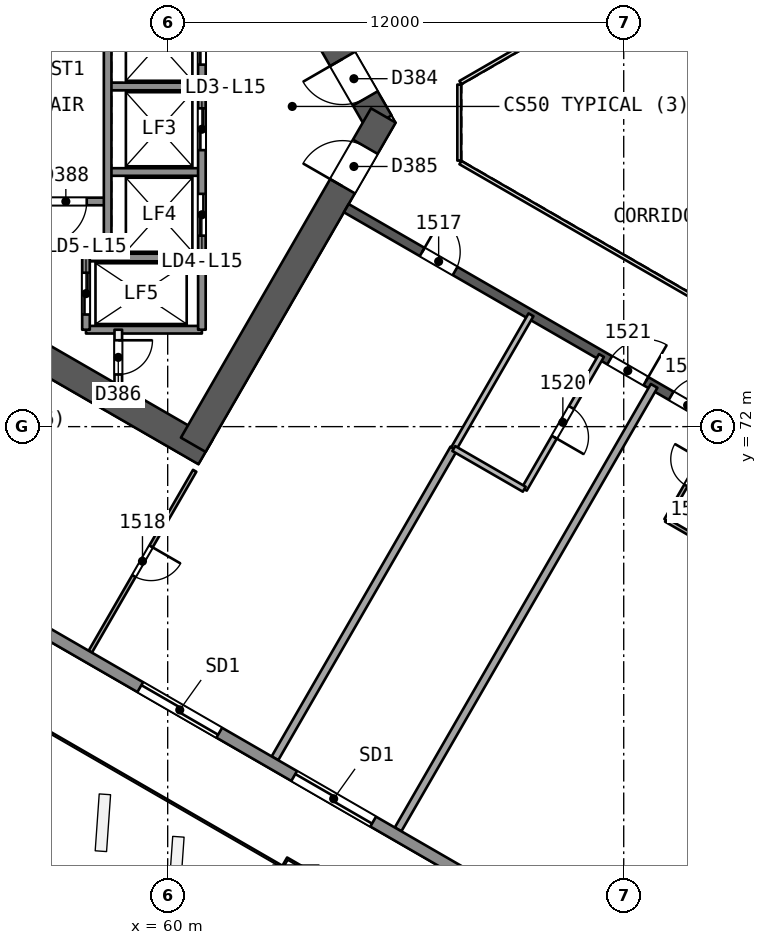
"""IFC4 building model, lengths in metres.
Left out: names, types, materials, properties, quantities, classifications, styles, units other than length and angle.
Written with IfcOpenShell. Run it as: python <this file> out.ifc"""

import sys

from ifc_helpers import new_model, si_unit, direction, frame, frame_2d, origin, origin_2d, place, context, subcontext, project, spatial, rectangle, extrude, element, fill, save


model = new_model("IFC4")
c1 = context("Model", 3, precision=1e-05, world=origin(), true_north=direction((0.0, 1.0)))
c2 = subcontext(c1, "Body", "Model", "MODEL_VIEW")
j1 = project(units=[si_unit("LENGTHUNIT", "METRE"), si_unit("PLANEANGLEUNIT", "RADIAN")], contexts=[c1])
p1 = place(None, origin())
s1 = spatial("IfcSite", under=j1, at=p1, CompositionType="ELEMENT")
p2 = place(p1, origin())
s2 = spatial("IfcBuilding", under=s1, at=p2, CompositionType="ELEMENT")
p3 = place(p2, frame((0.0, 0.0, 68.4)))
s3 = spatial("IfcBuildingStorey", under=s2, at=p3, CompositionType="ELEMENT", Elevation=68.4)
p4 = place(p3, frame((65.567, 80.0, 0.0), z_axis=(0.0, 0.0, 1.0), x_axis=(-0.499988615364, 0.866031976607, 0.0)))
e1 = element("IfcWall", 1, at=p4, inside=s3, PredefinedType="SHEAR", context=c2, shape_type="SweptSolid", body=[
    extrude(rectangle(XDim=10.163, YDim=0.75, at=frame_2d((5.082, 0.0))), origin(), (0.0, 0.0, 1.0), 3.7),
])
p5 = place(p4, frame((0.733, 0.0, 0.0)))
e2 = element("IfcOpeningElement", 2, at=p5, cuts=e1, PredefinedType="OPENING", context=c2, shape_type="SweptSolid", body=[
    extrude(rectangle(XDim=1.2, YDim=2.1, at=frame_2d((0.6, 1.05))), frame((0.0, 0.385, 0.0), z_axis=(0.0, -1.0, 0.0), x_axis=(1.0, 0.0, 0.0)), (0.0, 0.0, 1.0), 0.771),
])
p6 = place(p3, frame((60.673, 88.477, 0.0), z_axis=(0.0, 0.0, 1.0), x_axis=(-0.8660248072, -0.500001033313, 0.0)))
e3 = element("IfcWall", 3, at=p6, inside=s3, PredefinedType="SHEAR", context=c2, shape_type="SweptSolid", body=[
    extrude(rectangle(XDim=13.958, YDim=0.75, at=frame_2d((6.979, 0.0))), origin(), (0.0, 0.0, 1.0), 3.7),
])
p7 = place(p3, frame((48.772, 78.394, 0.0), z_axis=(0.0, 0.0, 1.0), x_axis=(0.866028339916, -0.499994914436, 0.0)))
e4 = element("IfcWall", 4, at=p7, inside=s3, PredefinedType="SHEAR", context=c2, shape_type="SweptSolid", body=[
    extrude(rectangle(XDim=14.117, YDim=0.75, at=frame_2d((7.059, 0.0))), origin(), (0.0, 0.0, 1.0), 3.7),
])
p8 = place(p3, frame((60.673, 71.523, 0.0), z_axis=(0.0, 0.0, 1.0), x_axis=(0.499997052475, 0.866027105532, 0.0)))
e5 = element("IfcWall", 5, at=p8, inside=s3, PredefinedType="SHEAR", context=c2, shape_type="SweptSolid", body=[
    extrude(rectangle(XDim=10.005, YDim=0.75, at=frame_2d((5.002, 0.0))), origin(), (0.0, 0.0, 1.0), 3.7),
])
p9 = place(p8, frame((7.855, 0.0, 0.0)))
e6 = element("IfcOpeningElement", 6, at=p9, cuts=e5, PredefinedType="OPENING", context=c2, shape_type="SweptSolid", body=[
    extrude(rectangle(XDim=1.2, YDim=2.1, at=frame_2d((0.6, 1.05))), frame((0.0, 0.385, 0.0), z_axis=(0.0, -1.0, 0.0), x_axis=(1.0, 0.0, 0.0)), (0.0, 0.0, 1.0), 0.771),
])
p10 = place(p3, frame((64.7, 77.748, 0.0), z_axis=(0.0, 0.0, 1.0), x_axis=(0.866026492143, -0.499998114903, 0.0)))
e7 = element("IfcWall", 7, at=p10, inside=s3, PredefinedType="SHEAR", context=c2, shape_type="SweptSolid", body=[
    extrude(rectangle(XDim=15.588, YDim=0.25, at=frame_2d((7.794, 0.0))), origin(), (0.0, 0.0, 1.0), 3.2),
])
p11 = place(p10, frame((2.306, 0.0, 0.0)))
e8 = element("IfcOpeningElement", 8, at=p11, cuts=e7, PredefinedType="OPENING", context=c2, shape_type="SweptSolid", body=[
    extrude(rectangle(XDim=1.0, YDim=2.1, at=frame_2d((0.5, 1.05))), frame((0.0, 0.135, 0.0), z_axis=(0.0, -1.0, 0.0), x_axis=(1.0, 0.0, 0.0)), (0.0, 0.0, 1.0), 0.271),
])
p12 = place(p10, frame((8.003, 0.0, 0.0)))
e9 = element("IfcOpeningElement", 9, at=p12, cuts=e7, PredefinedType="OPENING", context=c2, shape_type="SweptSolid", body=[
    extrude(rectangle(XDim=1.1, YDim=2.1, at=frame_2d((0.55, 1.05))), frame((0.0, 0.135, 0.0), z_axis=(0.0, -1.0, 0.0), x_axis=(1.0, 0.0, 0.0)), (0.0, 0.0, 1.0), 0.271),
])
p13 = place(p10, frame((9.871, 0.0, 0.0)))
e10 = element("IfcOpeningElement", 10, at=p13, cuts=e7, PredefinedType="OPENING", context=c2, shape_type="SweptSolid", body=[
    extrude(rectangle(XDim=1.0, YDim=2.1, at=frame_2d((0.5, 1.05))), frame((0.0, 0.135, 0.0), z_axis=(0.0, -1.0, 0.0), x_axis=(1.0, 0.0, 0.0)), (0.0, 0.0, 1.0), 0.271),
])
p14 = place(p3, frame((63.363, 59.844, 0.0), z_axis=(0.010092954999, 0.017481261926, 0.999796248113), x_axis=(-0.499907135807, -0.865843746475, 0.020185694418)))
e11 = element("IfcColumn", 11, at=p14, inside=s3, PredefinedType="COLUMN", context=c2, shape_type="SweptSolid", body=[
    extrude(rectangle(XDim=1.1, YDim=1.1, at=origin_2d()), origin(), (0.0, 0.0, 1.0), 3.701),
])
p15 = place(p3, frame((60.71, 70.838, 0.0), z_axis=(0.0, 0.0, 1.0), x_axis=(-0.499974920023, -0.866039883231, 0.0)))
e12 = element("IfcWall", 12, at=p15, inside=s3, PredefinedType="PARTITIONING", context=c2, shape_type="SweptSolid", body=[
    extrude(rectangle(XDim=5.497, YDim=0.1, at=frame_2d((2.749, 0.0))), origin(), (0.0, 0.0, 1.0), 3.2),
])
p16 = place(p15, frame((2.298, 0.0, 0.0)))
e13 = element("IfcOpeningElement", 13, at=p16, cuts=e12, PredefinedType="OPENING", context=c2, shape_type="SweptSolid", body=[
    extrude(rectangle(XDim=0.9, YDim=2.1, at=frame_2d((0.45, 1.05))), frame((0.0, 0.061, 0.0), z_axis=(0.0, -1.0, 0.0), x_axis=(1.0, 0.0, 0.0)), (0.0, 0.0, 1.0), 0.121),
])
p17 = place(p3, frame((62.822, 63.272, 0.0), z_axis=(0.0, 0.0, 1.0), x_axis=(0.50001657107, 0.866015836261, 0.0)))
e14 = element("IfcWall", 14, at=p17, inside=s3, PredefinedType="PARTITIONING", context=c2, shape_type="SweptSolid", body=[
    extrude(rectangle(XDim=9.413, YDim=0.2, at=frame_2d((4.707, 0.0))), origin(), (0.0, 0.0, 1.0), 3.2),
])
p18 = place(p3, frame((67.529, 71.424, 0.0), z_axis=(0.0, 0.0, 1.0), x_axis=(0.499984252764, 0.866034495264, 0.0)))
e15 = element("IfcWall", 15, at=p18, inside=s3, PredefinedType="PARTITIONING", context=c2, shape_type="SweptSolid", body=[
    extrude(rectangle(XDim=4.063, YDim=0.15, at=frame_2d((2.032, 0.0))), origin(), (0.0, 0.0, 1.0), 3.2),
])
p19 = place(p3, frame((71.414, 73.872, 0.0), z_axis=(0.0, 0.0, 1.0), x_axis=(-0.499984252764, -0.866034495264, 0.0)))
e16 = element("IfcWall", 16, at=p19, inside=s3, PredefinedType="PARTITIONING", context=c2, shape_type="SweptSolid", body=[
    extrude(rectangle(XDim=4.063, YDim=0.15, at=frame_2d((2.032, 0.0))), origin(), (0.0, 0.0, 1.0), 3.2),
])
p20 = place(p19, frame((1.582, 0.0, 0.0)))
e17 = element("IfcOpeningElement", 17, at=p20, cuts=e16, PredefinedType="OPENING", context=c2, shape_type="SweptSolid", body=[
    extrude(rectangle(XDim=0.9, YDim=2.1, at=frame_2d((0.45, 1.05))), frame((0.0, 0.085, 0.0), z_axis=(0.0, -1.0, 0.0), x_axis=(1.0, 0.0, 0.0)), (0.0, 0.0, 1.0), 0.171),
])
p21 = place(p3, frame((69.383, 70.353, 0.0), z_axis=(0.0, 0.0, 1.0), x_axis=(-0.866024183959, 0.500002112793, 0.0)))
e18 = element("IfcWall", 18, at=p21, inside=s3, PredefinedType="PARTITIONING", context=c2, shape_type="SweptSolid", body=[
    extrude(rectangle(XDim=2.141, YDim=0.15, at=frame_2d((1.071, 0.0))), origin(), (0.0, 0.0, 1.0), 3.2),
])
p22 = place(p3, frame((66.062, 61.401, 0.0), z_axis=(0.0, 0.0, 1.0), x_axis=(0.500006826849, 0.866021462265, 0.0)))
e19 = element("IfcWall", 19, at=p22, inside=s3, PredefinedType="PARTITIONING", context=c2, shape_type="SweptSolid", body=[
    extrude(rectangle(XDim=13.476, YDim=0.2, at=frame_2d((6.738, 0.0))), origin(), (0.0, 0.0, 1.0), 3.2),
])
p23 = place(p3, frame((74.498, 68.743, 0.0), z_axis=(0.0, 0.0, 1.0), x_axis=(-0.865989903783, 0.500061482766, 0.0)))
e20 = element("IfcWall", 20, at=p23, inside=s3, PredefinedType="PARTITIONING", context=c2, shape_type="SweptSolid", body=[
    extrude(rectangle(XDim=1.6, YDim=0.1, at=frame_2d((0.8, 0.0))), origin(), (0.0, 0.0, 1.0), 3.2),
])
p24 = place(p3, frame((73.113, 69.543, 0.0), z_axis=(0.0, 0.0, 1.0), x_axis=(0.499987231761, 0.866032775405, 0.0)))
e21 = element("IfcWall", 21, at=p24, inside=s3, PredefinedType="PARTITIONING", context=c2, shape_type="SweptSolid", body=[
    extrude(rectangle(XDim=2.9, YDim=0.1, at=frame_2d((1.45, 0.0))), origin(), (0.0, 0.0, 1.0), 3.2),
])
p25 = place(p24, frame((1.05, 0.0, 0.0)))
e22 = element("IfcOpeningElement", 22, at=p25, cuts=e21, PredefinedType="OPENING", context=c2, shape_type="SweptSolid", body=[
    extrude(rectangle(XDim=0.8, YDim=2.1, at=frame_2d((0.4, 1.05))), frame((0.0, 0.061, 0.0), z_axis=(0.0, -1.0, 0.0), x_axis=(1.0, 0.0, 0.0)), (0.0, 0.0, 1.0), 0.121),
])
p26 = place(p3, frame((90.443, 47.153, 0.0), z_axis=(0.0, 0.0, 1.0), x_axis=(-0.866024382485, 0.500001768939, 0.0)))
e23 = element("IfcWall", 23, at=p26, inside=s3, PredefinedType="SOLIDWALL", context=c2, shape_type="SweptSolid", body=[
    extrude(rectangle(XDim=59.596, YDim=0.3, at=frame_2d((29.798, 0.0))), origin(), (0.0, 0.0, 1.0), 3.2),
])
p27 = place(p26, frame((28.91, 0.0, 0.0)))
e24 = element("IfcOpeningElement", 24, at=p27, cuts=e23, PredefinedType="OPENING", context=c2, shape_type="SweptSolid", body=[
    extrude(rectangle(XDim=2.4, YDim=2.4, at=frame_2d((1.2, 1.2))), frame((0.0, 0.161, 0.0), z_axis=(0.0, -1.0, 0.0), x_axis=(1.0, 0.0, 0.0)), (0.0, 0.0, 1.0), 0.321),
])
p28 = place(p26, frame((33.586, 0.0, 0.0)))
e25 = element("IfcOpeningElement", 25, at=p28, cuts=e23, PredefinedType="OPENING", context=c2, shape_type="SweptSolid", body=[
    extrude(rectangle(XDim=2.4, YDim=2.4, at=frame_2d((1.2, 1.2))), frame((0.0, 0.161, 0.0), z_axis=(0.0, -1.0, 0.0), x_axis=(1.0, 0.0, 0.0)), (0.0, 0.0, 1.0), 0.321),
])
p29 = place(p26, frame((46.23, 0.0, 0.0)))
e26 = element("IfcOpeningElement", 26, at=p29, cuts=e23, PredefinedType="OPENING", context=c2, shape_type="SweptSolid", body=[
    extrude(rectangle(XDim=2.4, YDim=2.4, at=frame_2d((1.2, 1.2))), frame((0.0, 0.161, 0.0), z_axis=(0.0, -1.0, 0.0), x_axis=(1.0, 0.0, 0.0)), (0.0, 0.0, 1.0), 0.321),
])
p30 = place(p26, frame((12.876, 0.0, 0.0)))
e27 = element("IfcOpeningElement", 27, at=p30, cuts=e23, PredefinedType="OPENING", context=c2, shape_type="SweptSolid", body=[
    extrude(rectangle(XDim=2.4, YDim=2.4, at=frame_2d((1.2, 1.2))), frame((0.0, 0.161, 0.0), z_axis=(0.0, -1.0, 0.0), x_axis=(1.0, 0.0, 0.0)), (0.0, 0.0, 1.0), 0.321),
])
for number, where, z_axis, x_axis in (
    (28, (60.9, 80.95, 0.0), (0.0, 0.0, 1.0), (-1.0, 0.0, 0.0)),
    (29, (60.9, 78.7, 0.0), (0.0, 0.0, 1.0), (-1.0, 0.0, 0.0)),
):
    element("IfcWall", number, at=place(p3, frame(where, z_axis=z_axis, x_axis=x_axis)), inside=s3, PredefinedType="SOLIDWALL", context=c2, shape_type="SweptSolid", body=[
        extrude(rectangle(XDim=2.48, YDim=0.2, at=frame_2d((1.24, 0.0))), origin(), (0.0, 0.0, 1.0), 3.2),
    ])
p31 = place(p3, frame((58.42, 77.925, 0.0), z_axis=(0.0, 0.0, 1.0), x_axis=(-1.0, 0.0, 0.0)))
e30 = element("IfcWall", 30, at=p31, inside=s3, PredefinedType="SOLIDWALL", context=c2, shape_type="SweptSolid", body=[
    extrude(rectangle(XDim=7.7, YDim=0.2, at=frame_2d((3.85, 0.0))), origin(), (0.0, 0.0, 1.0), 3.2),
])
p32 = place(p31, frame((0.55, 0.0, 0.0)))
e31 = element("IfcOpeningElement", 31, at=p32, cuts=e30, PredefinedType="OPENING", context=c2, shape_type="SweptSolid", body=[
    extrude(rectangle(XDim=1.1, YDim=2.1, at=frame_2d((0.55, 1.05))), frame((0.0, 0.11, 0.0), z_axis=(0.0, -1.0, 0.0), x_axis=(1.0, 0.0, 0.0)), (0.0, 0.0, 1.0), 0.221),
])
for number, where, z_axis, x_axis in (
    (32, (60.9, 76.45, 0.0), (0.0, 0.0, 1.0), (-1.0, 0.0, 0.0)),
    (33, (60.9, 74.55, 0.0), (0.0, 0.0, 1.0), (-1.0, 0.0, 0.0)),
):
    element("IfcWall", number, at=place(p3, frame(where, z_axis=z_axis, x_axis=x_axis)), inside=s3, PredefinedType="SOLIDWALL", context=c2, shape_type="SweptSolid", body=[
        extrude(rectangle(XDim=3.05, YDim=0.2, at=frame_2d((1.525, 0.0))), origin(), (0.0, 0.0, 1.0), 3.2),
    ])
p33 = place(p3, frame((60.9, 85.45, 0.0), z_axis=(0.0, 0.0, 1.0), x_axis=(0.0, -1.0, 0.0)))
e34 = element("IfcWall", 34, at=p33, inside=s3, PredefinedType="SOLIDWALL", context=c2, shape_type="SweptSolid", body=[
    extrude(rectangle(XDim=10.9, YDim=0.2, at=frame_2d((5.45, 0.0))), origin(), (0.0, 0.0, 1.0), 3.2),
])
p34 = place(p33, frame((0.575, 0.0, 0.0)))
e35 = element("IfcOpeningElement", 35, at=p34, cuts=e34, PredefinedType="OPENING", context=c2, shape_type="SweptSolid", body=[
    extrude(rectangle(XDim=1.1, YDim=2.1, at=frame_2d((0.55, 1.05))), frame((0.0, 0.11, 0.0), z_axis=(0.0, -1.0, 0.0), x_axis=(1.0, 0.0, 0.0)), (0.0, 0.0, 1.0), 0.221),
])
p35 = place(p33, frame((2.825, 0.0, 0.0)))
e36 = element("IfcOpeningElement", 36, at=p35, cuts=e34, PredefinedType="OPENING", context=c2, shape_type="SweptSolid", body=[
    extrude(rectangle(XDim=1.1, YDim=2.1, at=frame_2d((0.55, 1.05))), frame((0.0, 0.11, 0.0), z_axis=(0.0, -1.0, 0.0), x_axis=(1.0, 0.0, 0.0)), (0.0, 0.0, 1.0), 0.221),
])
p36 = place(p33, frame((5.075, 0.0, 0.0)))
e37 = element("IfcOpeningElement", 37, at=p36, cuts=e34, PredefinedType="OPENING", context=c2, shape_type="SweptSolid", body=[
    extrude(rectangle(XDim=1.1, YDim=2.1, at=frame_2d((0.55, 1.05))), frame((0.0, 0.11, 0.0), z_axis=(0.0, -1.0, 0.0), x_axis=(1.0, 0.0, 0.0)), (0.0, 0.0, 1.0), 0.221),
])
p37 = place(p33, frame((7.325, 0.0, 0.0)))
e38 = element("IfcOpeningElement", 38, at=p37, cuts=e34, PredefinedType="OPENING", context=c2, shape_type="SweptSolid", body=[
    extrude(rectangle(XDim=1.1, YDim=2.1, at=frame_2d((0.55, 1.05))), frame((0.0, 0.11, 0.0), z_axis=(0.0, -1.0, 0.0), x_axis=(1.0, 0.0, 0.0)), (0.0, 0.0, 1.0), 0.221),
])
p38 = place(p3, frame((58.7, 74.55, 0.0), z_axis=(0.0, 0.0, 1.0), x_axis=(0.0, -1.0, 0.0)))
e39 = element("IfcWall", 39, at=p38, inside=s3, PredefinedType="PARTITIONING", context=c2, shape_type="SweptSolid", body=[
    extrude(rectangle(XDim=1.455, YDim=0.2, at=frame_2d((0.728, 0.0))), origin(), (0.0, 0.0, 1.0), 3.2),
])
p39 = place(p38, frame((0.278, 0.0, 0.0)))
e40 = element("IfcOpeningElement", 40, at=p39, cuts=e39, PredefinedType="OPENING", context=c2, shape_type="SweptSolid", body=[
    extrude(rectangle(XDim=0.9, YDim=2.1, at=frame_2d((0.45, 1.05))), frame((0.0, 0.11, 0.0), z_axis=(0.0, -1.0, 0.0), x_axis=(1.0, 0.0, 0.0)), (0.0, 0.0, 1.0), 0.221),
])
p40 = place(p3, frame((58.42, 85.45, 0.0), z_axis=(0.0, 0.0, 1.0), x_axis=(0.0, -1.0, 0.0)))
e41 = element("IfcWall", 41, at=p40, inside=s3, PredefinedType="SOLIDWALL", context=c2, shape_type="SweptSolid", body=[
    extrude(rectangle(XDim=9.0, YDim=0.2, at=frame_2d((4.5, 0.0))), origin(), (0.0, 0.0, 1.0), 3.2),
])
p41 = place(p3, frame((57.85, 76.45, 0.0), z_axis=(0.0, 0.0, 1.0), x_axis=(0.0, -1.0, 0.0)))
e42 = element("IfcWall", 42, at=p41, inside=s3, PredefinedType="SOLIDWALL", context=c2, shape_type="SweptSolid", body=[
    extrude(rectangle(XDim=1.9, YDim=0.2, at=frame_2d((0.95, 0.0))), origin(), (0.0, 0.0, 1.0), 3.2),
])
p42 = place(p41, frame((0.4, 0.0, 0.0)))
e43 = element("IfcOpeningElement", 43, at=p42, cuts=e42, PredefinedType="OPENING", context=c2, shape_type="SweptSolid", body=[
    extrude(rectangle(XDim=1.1, YDim=2.1, at=frame_2d((0.55, 1.05))), frame((0.0, 0.11, 0.0), z_axis=(0.0, -1.0, 0.0), x_axis=(1.0, 0.0, 0.0)), (0.0, 0.0, 1.0), 0.221),
])
p43 = place(p3, frame((77.738, 86.846, 0.0), z_axis=(0.0, 0.0, 1.0), x_axis=(-0.866026658274, -0.499997827154, 0.0)))
e44 = element("IfcWall", 44, at=p43, inside=s3, PredefinedType="PARTITIONING", context=c2, shape_type="SweptSolid", body=[
    extrude(rectangle(XDim=11.588, YDim=0.1, at=frame_2d((5.794, 0.0))), origin(), (0.0, 0.0, 1.0), 3.2),
])
p44 = place(p3, frame((67.672, 81.0, 0.0), z_axis=(0.0, 0.0, 1.0), x_axis=(0.0, -1.0, 0.0)))
e45 = element("IfcWall", 45, at=p44, inside=s3, PredefinedType="PARTITIONING", context=c2, shape_type="SweptSolid", body=[
    extrude(rectangle(XDim=2.0, YDim=0.1, at=frame_2d((1.0, 0.0))), origin(), (0.0, 0.0, 1.0), 3.2),
])
p45 = place(p3, frame((67.702, 78.948, 0.0), z_axis=(0.0, 0.0, 1.0), x_axis=(0.866026658274, -0.499997827154, 0.0)))
e46 = element("IfcWall", 46, at=p45, inside=s3, PredefinedType="PARTITIONING", context=c2, shape_type="SweptSolid", body=[
    extrude(rectangle(XDim=11.588, YDim=0.1, at=frame_2d((5.794, 0.0))), origin(), (0.0, 0.0, 1.0), 3.2),
])
p46 = place(p11, origin())
e47 = element("IfcDoor", 47, at=p46, inside=s3, OperationType="SINGLE_SWING_LEFT", PredefinedType="NOTDEFINED", context=c2, shape_type="SweptSolid", body=[
    extrude(rectangle(XDim=1.0, YDim=2.1, at=frame_2d((0.5, 1.05))), frame((0.0, 0.025, 0.0), z_axis=(0.0, -1.0, 0.0), x_axis=(1.0, 0.0, 0.0)), (0.0, 0.0, 1.0), 0.05),
])
fill(e8, e47)
p47 = place(p16, origin())
e48 = element("IfcDoor", 48, at=p47, inside=s3, OperationType="SINGLE_SWING_LEFT", PredefinedType="NOTDEFINED", context=c2, shape_type="SweptSolid", body=[
    extrude(rectangle(XDim=0.9, YDim=2.1, at=frame_2d((0.45, 1.05))), frame((0.0, 0.025, 0.0), z_axis=(0.0, -1.0, 0.0), x_axis=(1.0, 0.0, 0.0)), (0.0, 0.0, 1.0), 0.05),
])
fill(e13, e48)
p48 = place(p20, origin())
e49 = element("IfcDoor", 49, at=p48, inside=s3, OperationType="SINGLE_SWING_RIGHT", PredefinedType="NOTDEFINED", context=c2, shape_type="SweptSolid", body=[
    extrude(rectangle(XDim=0.9, YDim=2.1, at=frame_2d((0.45, 1.05))), frame((0.0, 0.025, 0.0), z_axis=(0.0, -1.0, 0.0), x_axis=(1.0, 0.0, 0.0)), (0.0, 0.0, 1.0), 0.05),
])
fill(e17, e49)
p49 = place(p12, origin())
e50 = element("IfcDoor", 50, at=p49, inside=s3, OperationType="SINGLE_SWING_RIGHT", PredefinedType="NOTDEFINED", context=c2, shape_type="SweptSolid", body=[
    extrude(rectangle(XDim=1.1, YDim=2.1, at=frame_2d((0.55, 1.05))), frame((0.0, 0.025, 0.0), z_axis=(0.0, -1.0, 0.0), x_axis=(1.0, 0.0, 0.0)), (0.0, 0.0, 1.0), 0.05),
])
fill(e9, e50)
p50 = place(p25, origin())
e51 = element("IfcDoor", 51, at=p50, inside=s3, OperationType="SINGLE_SWING_RIGHT", PredefinedType="NOTDEFINED", context=c2, shape_type="SweptSolid", body=[
    extrude(rectangle(XDim=0.8, YDim=2.1, at=frame_2d((0.4, 1.05))), frame((0.0, 0.025, 0.0), z_axis=(0.0, -1.0, 0.0), x_axis=(1.0, 0.0, 0.0)), (0.0, 0.0, 1.0), 0.05),
])
fill(e22, e51)
p51 = place(p13, origin())
e52 = element("IfcDoor", 52, at=p51, inside=s3, OperationType="SINGLE_SWING_RIGHT", PredefinedType="NOTDEFINED", context=c2, shape_type="SweptSolid", body=[
    extrude(rectangle(XDim=1.0, YDim=2.1, at=frame_2d((0.5, 1.05))), frame((0.0, 0.025, 0.0), z_axis=(0.0, -1.0, 0.0), x_axis=(1.0, 0.0, 0.0)), (0.0, 0.0, 1.0), 0.05),
])
fill(e10, e52)
p52 = place(p27, origin())
e53 = element("IfcDoor", 53, at=p52, inside=s3, OperationType="SLIDING_TO_LEFT", PredefinedType="NOTDEFINED", context=c2, shape_type="SweptSolid", body=[
    extrude(rectangle(XDim=2.4, YDim=2.4, at=frame_2d((1.2, 1.2))), frame((0.0, 0.025, 0.0), z_axis=(0.0, -1.0, 0.0), x_axis=(1.0, 0.0, 0.0)), (0.0, 0.0, 1.0), 0.05),
])
fill(e24, e53)
p53 = place(p28, origin())
e54 = element("IfcDoor", 54, at=p53, inside=s3, OperationType="SLIDING_TO_RIGHT", PredefinedType="NOTDEFINED", context=c2, shape_type="SweptSolid", body=[
    extrude(rectangle(XDim=2.4, YDim=2.4, at=frame_2d((1.2, 1.2))), frame((0.0, 0.025, 0.0), z_axis=(0.0, -1.0, 0.0), x_axis=(1.0, 0.0, 0.0)), (0.0, 0.0, 1.0), 0.05),
])
fill(e25, e54)
p54 = place(p5, origin())
e55 = element("IfcDoor", 55, at=p54, inside=s3, OperationType="SINGLE_SWING_RIGHT", PredefinedType="NOTDEFINED", context=c2, shape_type="SweptSolid", body=[
    extrude(rectangle(XDim=1.2, YDim=2.1, at=frame_2d((0.6, 1.05))), frame((0.0, 0.025, 0.0), z_axis=(0.0, -1.0, 0.0), x_axis=(1.0, 0.0, 0.0)), (0.0, 0.0, 1.0), 0.05),
])
fill(e2, e55)
p55 = place(p9, origin())
e56 = element("IfcDoor", 56, at=p55, inside=s3, OperationType="SINGLE_SWING_LEFT", PredefinedType="NOTDEFINED", context=c2, shape_type="SweptSolid", body=[
    extrude(rectangle(XDim=1.2, YDim=2.1, at=frame_2d((0.6, 1.05))), frame((0.0, 0.025, 0.0), z_axis=(0.0, -1.0, 0.0), x_axis=(1.0, 0.0, 0.0)), (0.0, 0.0, 1.0), 0.05),
])
fill(e6, e56)
p56 = place(p35, origin())
e57 = element("IfcDoor", 57, at=p56, inside=s3, OperationType="SLIDING_TO_LEFT", PredefinedType="NOTDEFINED", context=c2, shape_type="SweptSolid", body=[
    extrude(rectangle(XDim=1.1, YDim=2.1, at=frame_2d((0.55, 1.05))), frame((0.0, 0.025, 0.0), z_axis=(0.0, -1.0, 0.0), x_axis=(1.0, 0.0, 0.0)), (0.0, 0.0, 1.0), 0.05),
])
fill(e36, e57)
p57 = place(p36, origin())
e58 = element("IfcDoor", 58, at=p57, inside=s3, OperationType="SLIDING_TO_RIGHT", PredefinedType="NOTDEFINED", context=c2, shape_type="SweptSolid", body=[
    extrude(rectangle(XDim=1.1, YDim=2.1, at=frame_2d((0.55, 1.05))), frame((0.0, 0.025, 0.0), z_axis=(0.0, -1.0, 0.0), x_axis=(1.0, 0.0, 0.0)), (0.0, 0.0, 1.0), 0.05),
])
fill(e37, e58)
p58 = place(p37, origin())
e59 = element("IfcDoor", 59, at=p58, inside=s3, OperationType="SLIDING_TO_LEFT", PredefinedType="NOTDEFINED", context=c2, shape_type="SweptSolid", body=[
    extrude(rectangle(XDim=1.1, YDim=2.1, at=frame_2d((0.55, 1.05))), frame((0.0, 0.025, 0.0), z_axis=(0.0, -1.0, 0.0), x_axis=(1.0, 0.0, 0.0)), (0.0, 0.0, 1.0), 0.05),
])
fill(e38, e59)
p59 = place(p42, origin())
e60 = element("IfcDoor", 60, at=p59, inside=s3, OperationType="SLIDING_TO_RIGHT", PredefinedType="NOTDEFINED", context=c2, shape_type="SweptSolid", body=[
    extrude(rectangle(XDim=1.1, YDim=2.1, at=frame_2d((0.55, 1.05))), frame((0.0, 0.025, 0.0), z_axis=(0.0, -1.0, 0.0), x_axis=(1.0, 0.0, 0.0)), (0.0, 0.0, 1.0), 0.05),
])
fill(e43, e60)
p60 = place(p39, origin())
e61 = element("IfcDoor", 61, at=p60, inside=s3, OperationType="SINGLE_SWING_LEFT", PredefinedType="NOTDEFINED", context=c2, shape_type="SweptSolid", body=[
    extrude(rectangle(XDim=0.9, YDim=2.1, at=frame_2d((0.45, 1.05))), frame((0.0, 0.025, 0.0), z_axis=(0.0, -1.0, 0.0), x_axis=(1.0, 0.0, 0.0)), (0.0, 0.0, 1.0), 0.05),
])
fill(e40, e61)
p61 = place(p32, origin())
e62 = element("IfcDoor", 62, at=p61, inside=s3, OperationType="SINGLE_SWING_RIGHT", PredefinedType="NOTDEFINED", context=c2, shape_type="SweptSolid", body=[
    extrude(rectangle(XDim=1.1, YDim=2.1, at=frame_2d((0.55, 1.05))), frame((0.0, 0.025, 0.0), z_axis=(0.0, -1.0, 0.0), x_axis=(1.0, 0.0, 0.0)), (0.0, 0.0, 1.0), 0.05),
])
fill(e31, e62)
save(model, sys.argv[1])
